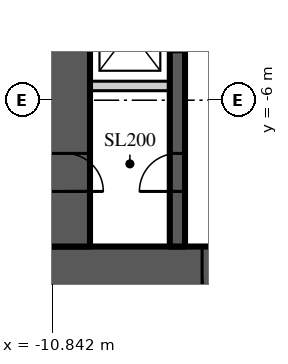
"""IFC4 building model, lengths in metres.
Left out: names, types, materials, properties, quantities, classifications, styles, units other than length and angle.
Written with IfcOpenShell. Run it as: python <this file> out.ifc"""

import sys

from ifc_helpers import new_model, si_unit, direction, frame, frame_2d, origin, place, context, subcontext, project, spatial, rectangle, extrude, element, fill, save


model = new_model("IFC4")
c1 = context("Model", 3, precision=1e-05, world=origin(), true_north=direction((0.0, 1.0)))
c2 = subcontext(c1, "Body", "Model", "MODEL_VIEW")
j1 = project(units=[si_unit("LENGTHUNIT", "METRE"), si_unit("PLANEANGLEUNIT", "RADIAN")], contexts=[c1])
p1 = place(None, origin())
s1 = spatial("IfcSite", under=j1, at=p1, CompositionType="ELEMENT")
p2 = place(p1, origin())
s2 = spatial("IfcBuilding", under=s1, at=p2, CompositionType="ELEMENT")
p3 = place(p2, frame((0.0, 0.0, 47.4)))
s3 = spatial("IfcBuildingStorey", under=s2, at=p3, CompositionType="ELEMENT", Elevation=47.4)
p4 = place(p3, frame((11.15, -10.5, 0.0), z_axis=(0.0, 0.0, 1.0), x_axis=(-1.0, 0.0, 0.0)))
e1 = element("IfcWall", 1, at=p4, inside=s3, PredefinedType="SHEAR", context=c2, shape_type="SweptSolid", body=[
    extrude(rectangle(XDim=22.3, YDim=1.3, at=frame_2d((11.15, 0.0))), origin(), (0.0, 0.0, 1.0), 3.9),
])
p5 = place(p4, frame((16.25, 0.0, 0.0)))
e2 = element("IfcOpeningElement", 2, at=p5, cuts=e1, PredefinedType="OPENING", context=c2, shape_type="SweptSolid", body=[
    extrude(rectangle(XDim=1.8, YDim=2.2, at=frame_2d((0.9, 1.1))), frame((0.0, 0.66, 0.0), z_axis=(0.0, -1.0, 0.0), x_axis=(1.0, 0.0, 0.0)), (0.0, 0.0, 1.0), 1.32),
])
p6 = place(p4, frame((4.25, 0.0, 0.0)))
e3 = element("IfcOpeningElement", 3, at=p6, cuts=e1, PredefinedType="OPENING", context=c2, shape_type="SweptSolid", body=[
    extrude(rectangle(XDim=1.8, YDim=2.2, at=frame_2d((0.9, 1.1))), frame((0.0, 0.66, 0.0), z_axis=(0.0, -1.0, 0.0), x_axis=(1.0, 0.0, 0.0)), (0.0, 0.0, 1.0), 1.32),
])
p7 = place(p3, frame((-10.5, 9.85, 0.0), z_axis=(0.0, 0.0, 1.0), x_axis=(0.0, -1.0, 0.0)))
e4 = element("IfcWall", 4, at=p7, inside=s3, PredefinedType="SHEAR", context=c2, shape_type="SweptSolid", body=[
    extrude(rectangle(XDim=19.7, YDim=1.3, at=frame_2d((9.85, 0.0))), origin(), (0.0, 0.0, 1.0), 3.9),
])
p8 = place(p7, frame((17.25, 0.0, 0.0)))
e5 = element("IfcOpeningElement", 5, at=p8, cuts=e4, PredefinedType="OPENING", context=c2, shape_type="SweptSolid", body=[
    extrude(rectangle(XDim=1.0, YDim=2.2, at=frame_2d((0.5, 1.1))), frame((0.0, 0.66, 0.0), z_axis=(0.0, -1.0, 0.0), x_axis=(1.0, 0.0, 0.0)), (0.0, 0.0, 1.0), 1.32),
])
p9 = place(p3, frame((-7.55, -9.85, 0.0), z_axis=(0.0, 0.0, 1.0), x_axis=(0.0, 1.0, 0.0)))
e6 = element("IfcWall", 6, at=p9, inside=s3, PredefinedType="SHEAR", context=c2, shape_type="SweptSolid", body=[
    extrude(rectangle(XDim=19.7, YDim=0.4, at=frame_2d((9.85, 0.0))), origin(), (0.0, 0.0, 1.0), 3.9),
])
p10 = place(p9, frame((1.45, 0.0, 0.0)))
e7 = element("IfcOpeningElement", 7, at=p10, cuts=e6, PredefinedType="OPENING", context=c2, shape_type="SweptSolid", body=[
    extrude(rectangle(XDim=1.0, YDim=2.2, at=frame_2d((0.5, 1.1))), frame((0.0, 0.21, 0.0), z_axis=(0.0, -1.0, 0.0), x_axis=(1.0, 0.0, 0.0)), (0.0, 0.0, 1.0), 0.42),
])
p11 = place(p9, frame((17.3, 0.0, 0.0)))
e8 = element("IfcOpeningElement", 8, at=p11, cuts=e6, PredefinedType="OPENING", context=c2, shape_type="SweptSolid", body=[
    extrude(rectangle(XDim=0.9, YDim=2.1, at=frame_2d((0.45, 1.05))), frame((0.0, 0.21, 0.0), z_axis=(0.0, -1.0, 0.0), x_axis=(1.0, 0.0, 0.0)), (0.0, 0.0, 1.0), 0.42),
])
p12 = place(p9, frame((5.125, 0.0, 0.0)))
e9 = element("IfcOpeningElement", 9, at=p12, cuts=e6, PredefinedType="OPENING", context=c2, shape_type="SweptSolid", body=[
    extrude(rectangle(XDim=1.1, YDim=2.2, at=frame_2d((0.55, 1.1))), frame((0.0, 0.21, 0.0), z_axis=(0.0, -1.0, 0.0), x_axis=(1.0, 0.0, 0.0)), (0.0, 0.0, 1.0), 0.42),
])
p13 = place(p9, frame((7.925, 0.0, 0.0)))
e10 = element("IfcOpeningElement", 10, at=p13, cuts=e6, PredefinedType="OPENING", context=c2, shape_type="SweptSolid", body=[
    extrude(rectangle(XDim=1.1, YDim=2.2, at=frame_2d((0.55, 1.1))), frame((0.0, 0.21, 0.0), z_axis=(0.0, -1.0, 0.0), x_axis=(1.0, 0.0, 0.0)), (0.0, 0.0, 1.0), 0.42),
])
p14 = place(p9, frame((10.675, 0.0, 0.0)))
e11 = element("IfcOpeningElement", 11, at=p14, cuts=e6, PredefinedType="OPENING", context=c2, shape_type="SweptSolid", body=[
    extrude(rectangle(XDim=1.1, YDim=2.2, at=frame_2d((0.55, 1.1))), frame((0.0, 0.21, 0.0), z_axis=(0.0, -1.0, 0.0), x_axis=(1.0, 0.0, 0.0)), (0.0, 0.0, 1.0), 0.42),
])
p15 = place(p9, frame((13.475, 0.0, 0.0)))
e12 = element("IfcOpeningElement", 12, at=p15, cuts=e6, PredefinedType="OPENING", context=c2, shape_type="SweptSolid", body=[
    extrude(rectangle(XDim=1.1, YDim=2.2, at=frame_2d((0.55, 1.1))), frame((0.0, 0.21, 0.0), z_axis=(0.0, -1.0, 0.0), x_axis=(1.0, 0.0, 0.0)), (0.0, 0.0, 1.0), 0.42),
])
p16 = place(p3, frame((-9.85, -5.625, 0.0), z_axis=(0.0, 0.0, 1.0), x_axis=(1.0, 0.0, 0.0)))
e13 = element("IfcWall", 13, at=p16, inside=s3, PredefinedType="SOLIDWALL", context=c2, shape_type="SweptSolid", body=[
    extrude(rectangle(XDim=2.1, YDim=0.25, at=frame_2d((1.05, 0.0))), origin(), (0.0, 0.0, 1.0), 3.7),
])
p17 = place(p5, origin())
e14 = element("IfcDoor", 14, at=p17, inside=s3, OperationType="DOUBLE_DOOR_DOUBLE_SWING", PredefinedType="DOOR", context=c2, shape_type="SweptSolid", body=[
    extrude(rectangle(XDim=1.8, YDim=2.2, at=frame_2d((0.9, 1.1))), frame((0.0, 0.025, 0.0), z_axis=(0.0, -1.0, 0.0), x_axis=(1.0, 0.0, 0.0)), (0.0, 0.0, 1.0), 0.05),
])
fill(e2, e14)
p18 = place(p10, origin())
e15 = element("IfcDoor", 15, at=p18, inside=s3, OperationType="SINGLE_SWING_LEFT", PredefinedType="DOOR", context=c2, shape_type="SweptSolid", body=[
    extrude(rectangle(XDim=1.0, YDim=2.2, at=frame_2d((0.5, 1.1))), frame((0.0, 0.025, 0.0), z_axis=(0.0, -1.0, 0.0), x_axis=(1.0, 0.0, 0.0)), (0.0, 0.0, 1.0), 0.05),
])
fill(e7, e15)
p19 = place(p8, origin())
e16 = element("IfcDoor", 16, at=p19, inside=s3, OperationType="SINGLE_SWING_RIGHT", PredefinedType="DOOR", context=c2, shape_type="SweptSolid", body=[
    extrude(rectangle(XDim=1.0, YDim=2.2, at=frame_2d((0.5, 1.1))), frame((0.0, 0.025, 0.0), z_axis=(0.0, -1.0, 0.0), x_axis=(1.0, 0.0, 0.0)), (0.0, 0.0, 1.0), 0.05),
])
fill(e5, e16)
save(model, sys.argv[1])
